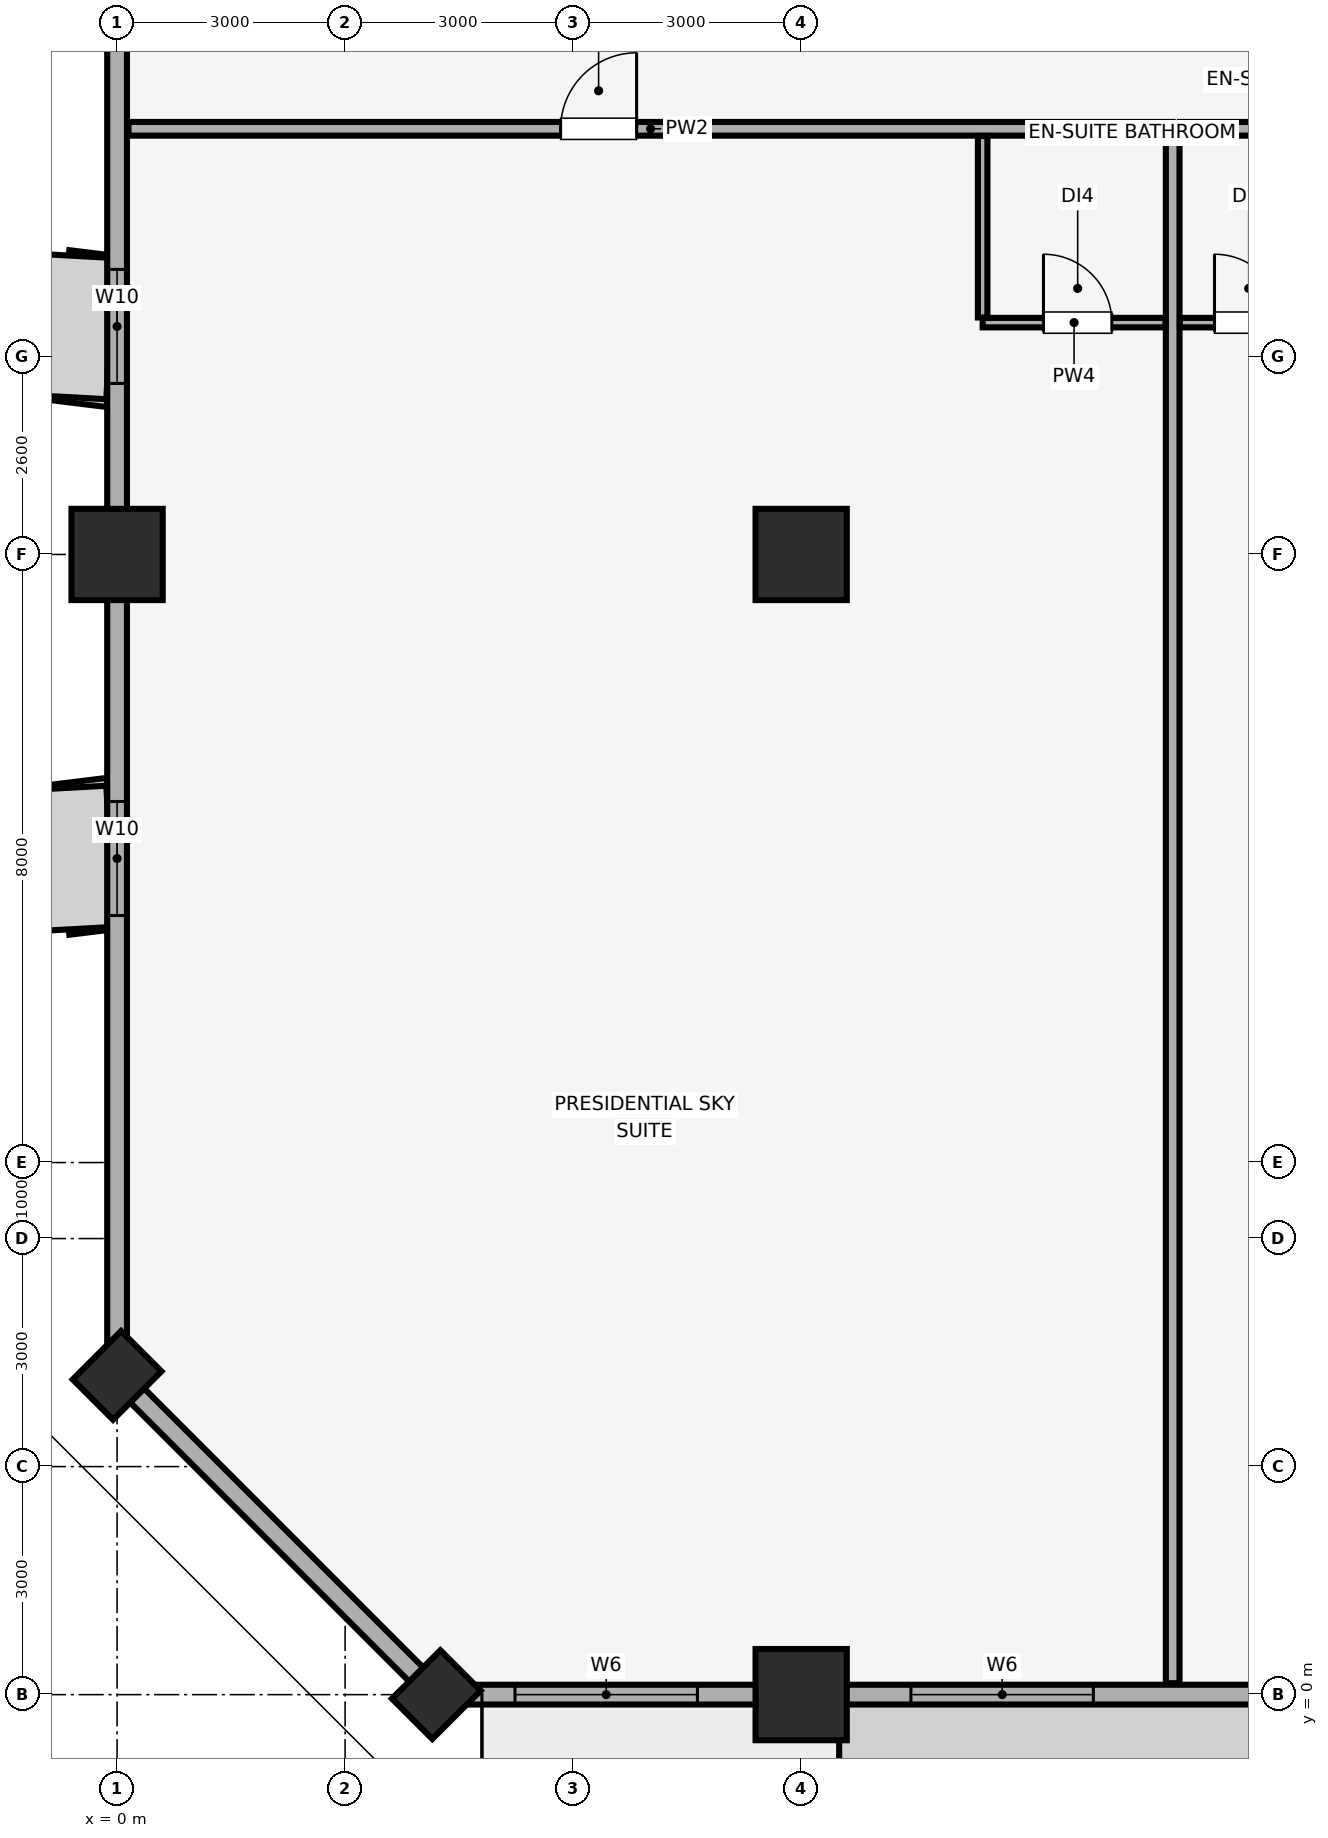
"""IFC4 building model, lengths in metres.
Left out: names, types, materials, properties, quantities, classifications, styles, units other than length and angle.
Written with IfcOpenShell. Run it as: python <this file> out.ifc"""

import sys

from ifc_helpers import new_model, si_unit, direction, frame, frame_2d, origin, origin_2d, place, context, subcontext, project, spatial, rectangle, extrude, element, fill, save


model = new_model("IFC4")
c1 = context("Model", 3, precision=1e-05, world=origin(), true_north=direction((0.0, 1.0)))
c2 = subcontext(c1, "Body", "Model", "MODEL_VIEW")
j1 = project(units=[si_unit("LENGTHUNIT", "METRE"), si_unit("PLANEANGLEUNIT", "RADIAN")], contexts=[c1])
p1 = place(None, origin())
s1 = spatial("IfcSite", under=j1, at=p1, CompositionType="ELEMENT")
p2 = place(p1, origin())
s2 = spatial("IfcBuilding", under=s1, at=p2, CompositionType="ELEMENT")
p3 = place(p2, frame((0.0, 0.0, 93.05)))
s3 = spatial("IfcBuildingStorey", under=s2, at=p3, CompositionType="ELEMENT", Elevation=93.05)
for number, where, z_axis, x_axis in (
    (1, (9.0, 0.0, 0.0), (0.0, 0.0, 1.0), (1.0, 0.0, 0.0)),
    (2, (0.0, 15.0, 0.0), (0.0, 0.0, 1.0), (1.0, 0.0, 0.0)),
):
    element("IfcColumn", number, at=place(p3, frame(where, z_axis=z_axis, x_axis=x_axis)), inside=s3, PredefinedType="COLUMN", context=c2, shape_type="SweptSolid", body=[
        extrude(rectangle(XDim=1.2, YDim=1.2, at=origin_2d()), origin(), (0.0, 0.0, 1.0), 3.51),
    ])
for number, where, z_axis, x_axis in (
    (3, (4.2, 0.0, 0.0), (0.0, 0.0, 1.0), (0.707, 0.707, 0.0)),
    (4, (0.0, 4.2, 0.0), (0.0, 0.0, 1.0), (0.707, 0.707, 0.0)),
):
    element("IfcColumn", number, at=place(p3, frame(where, z_axis=z_axis, x_axis=x_axis)), inside=s3, PredefinedType="PILASTER", context=c2, shape_type="SweptSolid", body=[
        extrude(rectangle(XDim=0.9, YDim=0.75, at=origin_2d()), origin(), (0.0, 0.0, 1.0), 3.51),
    ])
p4 = place(p3, frame((9.0, 15.0, 0.0), z_axis=(0.0, 0.0, 1.0), x_axis=(1.0, 0.0, 0.0)))
e5 = element("IfcColumn", 5, at=p4, inside=s3, PredefinedType="COLUMN", context=c2, shape_type="SweptSolid", body=[
    extrude(rectangle(XDim=1.2, YDim=1.2, at=origin_2d()), origin(), (0.0, 0.0, 1.0), 3.51),
])
p5 = place(p3, frame((4.2, 0.0, 0.0), z_axis=(0.0, 0.0, 1.0), x_axis=(1.0, 0.0, 0.0)))
e6 = element("IfcWall", 6, at=p5, inside=s3, PredefinedType="SOLIDWALL", context=c2, shape_type="SweptSolid", body=[
    extrude(rectangle(XDim=75.6, YDim=0.26, at=frame_2d((37.8, 0.0))), origin(), (0.0, 0.0, 1.0), 2.56),
])
p6 = place(p5, frame((21.383, 0.0, 0.0)))
e7 = element("IfcOpeningElement", 7, at=p6, cuts=e6, PredefinedType="OPENING", context=c2, shape_type="SweptSolid", body=[
    extrude(rectangle(XDim=1.1, YDim=2.15, at=frame_2d((0.55, 1.075))), frame((0.0, 0.14, 0.0), z_axis=(0.0, -1.0, 0.0), x_axis=(1.0, 0.0, 0.0)), (0.0, 0.0, 1.0), 0.28),
])
p7 = place(p5, frame((36.05, 0.0, 0.0)))
e8 = element("IfcOpeningElement", 8, at=p7, cuts=e6, PredefinedType="OPENING", context=c2, shape_type="SweptSolid", body=[
    extrude(rectangle(XDim=1.1, YDim=2.15, at=frame_2d((0.55, 1.075))), frame((0.0, 0.14, 0.0), z_axis=(0.0, -1.0, 0.0), x_axis=(1.0, 0.0, 0.0)), (0.0, 0.0, 1.0), 0.28),
])
p8 = place(p5, frame((53.117, 0.0, 0.0)))
e9 = element("IfcOpeningElement", 9, at=p8, cuts=e6, PredefinedType="OPENING", context=c2, shape_type="SweptSolid", body=[
    extrude(rectangle(XDim=1.1, YDim=2.15, at=frame_2d((0.55, 1.075))), frame((0.0, 0.14, 0.0), z_axis=(0.0, -1.0, 0.0), x_axis=(1.0, 0.0, 0.0)), (0.0, 0.0, 1.0), 0.28),
])
p9 = place(p5, frame((1.035, 0.0, 0.85)))
e10 = element("IfcOpeningElement", 10, at=p9, cuts=e6, PredefinedType="OPENING", context=c2, shape_type="SweptSolid", body=[
    extrude(rectangle(XDim=2.4, YDim=1.5, at=frame_2d((1.2, 0.75))), frame((0.0, 0.14, 0.0), z_axis=(0.0, -1.0, 0.0), x_axis=(1.0, 0.0, 0.0)), (0.0, 0.0, 1.0), 0.28),
])
p10 = place(p5, frame((6.244, 0.0, 0.85)))
e11 = element("IfcOpeningElement", 11, at=p10, cuts=e6, PredefinedType="OPENING", context=c2, shape_type="SweptSolid", body=[
    extrude(rectangle(XDim=2.4, YDim=1.5, at=frame_2d((1.2, 0.75))), frame((0.0, 0.14, 0.0), z_axis=(0.0, -1.0, 0.0), x_axis=(1.0, 0.0, 0.0)), (0.0, 0.0, 1.0), 0.28),
])
p11 = place(p5, frame((14.4, 0.0, 0.85)))
e12 = element("IfcOpeningElement", 12, at=p11, cuts=e6, PredefinedType="OPENING", context=c2, shape_type="SweptSolid", body=[
    extrude(rectangle(XDim=2.4, YDim=1.5, at=frame_2d((1.2, 0.75))), frame((0.0, 0.14, 0.0), z_axis=(0.0, -1.0, 0.0), x_axis=(1.0, 0.0, 0.0)), (0.0, 0.0, 1.0), 0.28),
])
p12 = place(p5, frame((23.127, 0.0, 0.85)))
e13 = element("IfcOpeningElement", 13, at=p12, cuts=e6, PredefinedType="OPENING", context=c2, shape_type="SweptSolid", body=[
    extrude(rectangle(XDim=2.4, YDim=1.5, at=frame_2d((1.2, 0.75))), frame((0.0, 0.14, 0.0), z_axis=(0.0, -1.0, 0.0), x_axis=(1.0, 0.0, 0.0)), (0.0, 0.0, 1.0), 0.28),
])
p13 = place(p5, frame((29.681, 0.0, 0.85)))
e14 = element("IfcOpeningElement", 14, at=p13, cuts=e6, PredefinedType="OPENING", context=c2, shape_type="SweptSolid", body=[
    extrude(rectangle(XDim=2.4, YDim=1.5, at=frame_2d((1.2, 0.75))), frame((0.0, 0.14, 0.0), z_axis=(0.0, -1.0, 0.0), x_axis=(1.0, 0.0, 0.0)), (0.0, 0.0, 1.0), 0.28),
])
p14 = place(p5, frame((38.601, 0.0, 0.85)))
e15 = element("IfcOpeningElement", 15, at=p14, cuts=e6, PredefinedType="OPENING", context=c2, shape_type="SweptSolid", body=[
    extrude(rectangle(XDim=2.4, YDim=1.5, at=frame_2d((1.2, 0.75))), frame((0.0, 0.14, 0.0), z_axis=(0.0, -1.0, 0.0), x_axis=(1.0, 0.0, 0.0)), (0.0, 0.0, 1.0), 0.28),
])
p15 = place(p5, frame((43.719, 0.0, 0.85)))
e16 = element("IfcOpeningElement", 16, at=p15, cuts=e6, PredefinedType="OPENING", context=c2, shape_type="SweptSolid", body=[
    extrude(rectangle(XDim=2.4, YDim=1.5, at=frame_2d((1.2, 0.75))), frame((0.0, 0.14, 0.0), z_axis=(0.0, -1.0, 0.0), x_axis=(1.0, 0.0, 0.0)), (0.0, 0.0, 1.0), 0.28),
])
p16 = place(p5, frame((50.073, 0.0, 0.85)))
e17 = element("IfcOpeningElement", 17, at=p16, cuts=e6, PredefinedType="OPENING", context=c2, shape_type="SweptSolid", body=[
    extrude(rectangle(XDim=2.4, YDim=1.5, at=frame_2d((1.2, 0.75))), frame((0.0, 0.14, 0.0), z_axis=(0.0, -1.0, 0.0), x_axis=(1.0, 0.0, 0.0)), (0.0, 0.0, 1.0), 0.28),
])
p17 = place(p5, frame((58.838, 0.0, 0.85)))
e18 = element("IfcOpeningElement", 18, at=p17, cuts=e6, PredefinedType="OPENING", context=c2, shape_type="SweptSolid", body=[
    extrude(rectangle(XDim=2.4, YDim=1.5, at=frame_2d((1.2, 0.75))), frame((0.0, 0.14, 0.0), z_axis=(0.0, -1.0, 0.0), x_axis=(1.0, 0.0, 0.0)), (0.0, 0.0, 1.0), 0.28),
])
p18 = place(p5, frame((67.056, 0.0, 0.85)))
e19 = element("IfcOpeningElement", 19, at=p18, cuts=e6, PredefinedType="OPENING", context=c2, shape_type="SweptSolid", body=[
    extrude(rectangle(XDim=2.4, YDim=1.5, at=frame_2d((1.2, 0.75))), frame((0.0, 0.14, 0.0), z_axis=(0.0, -1.0, 0.0), x_axis=(1.0, 0.0, 0.0)), (0.0, 0.0, 1.0), 0.28),
])
p19 = place(p5, frame((72.165, 0.0, 0.85)))
e20 = element("IfcOpeningElement", 20, at=p19, cuts=e6, PredefinedType="OPENING", context=c2, shape_type="SweptSolid", body=[
    extrude(rectangle(XDim=2.4, YDim=1.5, at=frame_2d((1.2, 0.75))), frame((0.0, 0.14, 0.0), z_axis=(0.0, -1.0, 0.0), x_axis=(1.0, 0.0, 0.0)), (0.0, 0.0, 1.0), 0.28),
])
p20 = place(p3, frame((0.0, 44.8, 0.0), z_axis=(0.0, 0.0, 1.0), x_axis=(0.0, -1.0, 0.0)))
e21 = element("IfcWall", 21, at=p20, inside=s3, PredefinedType="SOLIDWALL", context=c2, shape_type="SweptSolid", body=[
    extrude(rectangle(XDim=40.6, YDim=0.26, at=frame_2d((20.3, 0.0))), origin(), (0.0, 0.0, 1.0), 2.56),
])
p21 = place(p20, frame((33.05, 0.0, 0.85)))
e22 = element("IfcOpeningElement", 22, at=p21, cuts=e21, PredefinedType="OPENING", context=c2, shape_type="SweptSolid", body=[
    extrude(rectangle(XDim=1.5, YDim=1.4, at=frame_2d((0.75, 0.7))), frame((0.0, 0.14, 0.0), z_axis=(0.0, -1.0, 0.0), x_axis=(1.0, 0.0, 0.0)), (0.0, 0.0, 1.0), 0.28),
])
p22 = place(p20, frame((26.05, 0.0, 0.85)))
e23 = element("IfcOpeningElement", 23, at=p22, cuts=e21, PredefinedType="OPENING", context=c2, shape_type="SweptSolid", body=[
    extrude(rectangle(XDim=1.5, YDim=1.4, at=frame_2d((0.75, 0.7))), frame((0.0, 0.14, 0.0), z_axis=(0.0, -1.0, 0.0), x_axis=(1.0, 0.0, 0.0)), (0.0, 0.0, 1.0), 0.28),
])
p23 = place(p20, frame((18.325, 0.0, 0.85)))
e24 = element("IfcOpeningElement", 24, at=p23, cuts=e21, PredefinedType="OPENING", context=c2, shape_type="SweptSolid", body=[
    extrude(rectangle(XDim=1.5, YDim=1.4, at=frame_2d((0.75, 0.7))), frame((0.0, 0.14, 0.0), z_axis=(0.0, -1.0, 0.0), x_axis=(1.0, 0.0, 0.0)), (0.0, 0.0, 1.0), 0.28),
])
p24 = place(p20, frame((11.935, 0.0, 0.85)))
e25 = element("IfcOpeningElement", 25, at=p24, cuts=e21, PredefinedType="OPENING", context=c2, shape_type="SweptSolid", body=[
    extrude(rectangle(XDim=1.5, YDim=1.4, at=frame_2d((0.75, 0.7))), frame((0.0, 0.14, 0.0), z_axis=(0.0, -1.0, 0.0), x_axis=(1.0, 0.0, 0.0)), (0.0, 0.0, 1.0), 0.28),
])
p25 = place(p20, frame((7.165, 0.0, 0.85)))
e26 = element("IfcOpeningElement", 26, at=p25, cuts=e21, PredefinedType="OPENING", context=c2, shape_type="SweptSolid", body=[
    extrude(rectangle(XDim=1.5, YDim=1.4, at=frame_2d((0.75, 0.7))), frame((0.0, 0.14, 0.0), z_axis=(0.0, -1.0, 0.0), x_axis=(1.0, 0.0, 0.0)), (0.0, 0.0, 1.0), 0.28),
])
p26 = place(p20, frame((1.735, 0.0, 0.85)))
e27 = element("IfcOpeningElement", 27, at=p26, cuts=e21, PredefinedType="OPENING", context=c2, shape_type="SweptSolid", body=[
    extrude(rectangle(XDim=1.5, YDim=1.4, at=frame_2d((0.75, 0.7))), frame((0.0, 0.14, 0.0), z_axis=(0.0, -1.0, 0.0), x_axis=(1.0, 0.0, 0.0)), (0.0, 0.0, 1.0), 0.28),
])
p27 = place(p3, frame((0.0, 4.2, 0.0), z_axis=(0.0, 0.0, 1.0), x_axis=(0.707106781187, -0.707106781187, 0.0)))
e28 = element("IfcWall", 28, at=p27, inside=s3, PredefinedType="SOLIDWALL", context=c2, shape_type="SweptSolid", body=[
    extrude(rectangle(XDim=5.94, YDim=0.26, at=frame_2d((2.97, 0.0))), origin(), (0.0, 0.0, 1.0), 2.56),
])
p28 = place(p3, frame((0.15, 20.6, 0.0), z_axis=(0.0, 0.0, 1.0), x_axis=(1.0, 0.0, 0.0)))
e29 = element("IfcWall", 29, at=p28, inside=s3, PredefinedType="PARTITIONING", context=c2, shape_type="SweptSolid", body=[
    extrude(rectangle(XDim=13.738, YDim=0.18, at=frame_2d((6.869, 0.0))), origin(), (0.0, 0.0, 1.0), 3.51),
])
p29 = place(p28, frame((5.685, 0.0, 0.0)))
e30 = element("IfcOpeningElement", 30, at=p29, cuts=e29, PredefinedType="OPENING", context=c2, shape_type="SweptSolid", body=[
    extrude(rectangle(XDim=1.0, YDim=2.15, at=frame_2d((0.5, 1.075))), frame((0.0, 0.1, 0.0), z_axis=(0.0, -1.0, 0.0), x_axis=(1.0, 0.0, 0.0)), (0.0, 0.0, 1.0), 0.2),
])
p30 = place(p3, frame((13.888, 0.15, 0.0), z_axis=(0.0, 0.0, 1.0), x_axis=(0.0, 1.0, 0.0)))
e31 = element("IfcWall", 31, at=p30, inside=s3, PredefinedType="PARTITIONING", context=c2, shape_type="SweptSolid", body=[
    extrude(rectangle(XDim=20.355, YDim=0.18, at=frame_2d((10.177, 0.0))), origin(), (0.0, 0.0, 1.0), 3.51),
])
p31 = place(p3, frame((11.388, 18.05, 0.0), z_axis=(0.0, 0.0, 1.0), x_axis=(1.0, 0.0, 0.0)))
e32 = element("IfcWall", 32, at=p31, inside=s3, PredefinedType="PARTITIONING", context=c2, shape_type="SweptSolid", body=[
    extrude(rectangle(XDim=2.405, YDim=0.125, at=frame_2d((1.203, 0.0))), origin(), (0.0, 0.0, 1.0), 3.51),
])
p32 = place(p31, frame((0.8, 0.0, 0.0)))
e33 = element("IfcOpeningElement", 33, at=p32, cuts=e32, PredefinedType="OPENING", context=c2, shape_type="SweptSolid", body=[
    extrude(rectangle(XDim=0.9, YDim=2.1, at=frame_2d((0.45, 1.05))), frame((0.0, 0.073, 0.0), z_axis=(0.0, -1.0, 0.0), x_axis=(1.0, 0.0, 0.0)), (0.0, 0.0, 1.0), 0.145),
])
p33 = place(p3, frame((11.388, 18.117, 0.0), z_axis=(0.0, 0.0, 1.0), x_axis=(0.0, 1.0, 0.0)))
e34 = element("IfcWall", 34, at=p33, inside=s3, PredefinedType="PARTITIONING", context=c2, shape_type="SweptSolid", body=[
    extrude(rectangle(XDim=2.387, YDim=0.125, at=frame_2d((1.194, 0.0))), origin(), (0.0, 0.0, 1.0), 3.51),
])
p34 = place(p3, frame((13.983, 20.6, 0.0), z_axis=(0.0, 0.0, 1.0), x_axis=(1.0, 0.0, 0.0)))
e35 = element("IfcWall", 35, at=p34, inside=s3, PredefinedType="PARTITIONING", context=c2, shape_type="SweptSolid", body=[
    extrude(rectangle(XDim=9.343, YDim=0.18, at=frame_2d((4.671, 0.0))), origin(), (0.0, 0.0, 1.0), 3.51),
])
p35 = place(p34, frame((5.471, 0.0, 0.0)))
e36 = element("IfcOpeningElement", 36, at=p35, cuts=e35, PredefinedType="OPENING", context=c2, shape_type="SweptSolid", body=[
    extrude(rectangle(XDim=1.0, YDim=2.15, at=frame_2d((0.5, 1.075))), frame((0.0, 0.1, 0.0), z_axis=(0.0, -1.0, 0.0), x_axis=(1.0, 0.0, 0.0)), (0.0, 0.0, 1.0), 0.2),
])
p36 = place(p3, frame((13.983, 18.05, 0.0), z_axis=(0.0, 0.0, 1.0), x_axis=(1.0, 0.0, 0.0)))
e37 = element("IfcWall", 37, at=p36, inside=s3, PredefinedType="PARTITIONING", context=c2, shape_type="SweptSolid", body=[
    extrude(rectangle(XDim=2.405, YDim=0.125, at=frame_2d((1.203, 0.0))), origin(), (0.0, 0.0, 1.0), 3.51),
])
p37 = place(p36, frame((0.455, 0.0, 0.0)))
e38 = element("IfcOpeningElement", 38, at=p37, cuts=e37, PredefinedType="OPENING", context=c2, shape_type="SweptSolid", body=[
    extrude(rectangle(XDim=0.9, YDim=2.1, at=frame_2d((0.45, 1.05))), frame((0.0, 0.073, 0.0), z_axis=(0.0, -1.0, 0.0), x_axis=(1.0, 0.0, 0.0)), (0.0, 0.0, 1.0), 0.145),
])
p38 = place(p9, origin())
e39 = element("IfcWindow", 39, at=p38, inside=s3, PartitioningType="SINGLE_PANEL", PredefinedType="WINDOW", context=c2, shape_type="SweptSolid", body=[
    extrude(rectangle(XDim=2.4, YDim=1.5, at=frame_2d((1.2, 0.75))), frame((0.0, 0.03, 0.0), z_axis=(0.0, -1.0, 0.0), x_axis=(1.0, 0.0, 0.0)), (0.0, 0.0, 1.0), 0.06),
])
fill(e10, e39)
p39 = place(p10, origin())
e40 = element("IfcWindow", 40, at=p39, inside=s3, PartitioningType="SINGLE_PANEL", PredefinedType="WINDOW", context=c2, shape_type="SweptSolid", body=[
    extrude(rectangle(XDim=2.4, YDim=1.5, at=frame_2d((1.2, 0.75))), frame((0.0, 0.03, 0.0), z_axis=(0.0, -1.0, 0.0), x_axis=(1.0, 0.0, 0.0)), (0.0, 0.0, 1.0), 0.06),
])
fill(e11, e40)
p40 = place(p21, origin())
e41 = element("IfcWindow", 41, at=p40, inside=s3, PartitioningType="SINGLE_PANEL", PredefinedType="WINDOW", context=c2, shape_type="SweptSolid", body=[
    extrude(rectangle(XDim=1.5, YDim=1.4, at=frame_2d((0.75, 0.7))), frame((0.0, 0.03, 0.0), z_axis=(0.0, -1.0, 0.0), x_axis=(1.0, 0.0, 0.0)), (0.0, 0.0, 1.0), 0.06),
])
fill(e22, e41)
p41 = place(p22, origin())
e42 = element("IfcWindow", 42, at=p41, inside=s3, PartitioningType="SINGLE_PANEL", PredefinedType="WINDOW", context=c2, shape_type="SweptSolid", body=[
    extrude(rectangle(XDim=1.5, YDim=1.4, at=frame_2d((0.75, 0.7))), frame((0.0, 0.03, 0.0), z_axis=(0.0, -1.0, 0.0), x_axis=(1.0, 0.0, 0.0)), (0.0, 0.0, 1.0), 0.06),
])
fill(e23, e42)
p42 = place(p29, origin())
e43 = element("IfcDoor", 43, at=p42, inside=s3, OperationType="SINGLE_SWING_RIGHT", PredefinedType="DOOR", context=c2, shape_type="SweptSolid", body=[
    extrude(rectangle(XDim=1.0, YDim=2.15, at=frame_2d((0.5, 1.075))), frame((0.0, 0.025, 0.0), z_axis=(0.0, -1.0, 0.0), x_axis=(1.0, 0.0, 0.0)), (0.0, 0.0, 1.0), 0.05),
])
fill(e30, e43)
p43 = place(p32, origin())
e44 = element("IfcDoor", 44, at=p43, inside=s3, OperationType="SINGLE_SWING_LEFT", PredefinedType="DOOR", context=c2, shape_type="SweptSolid", body=[
    extrude(rectangle(XDim=0.9, YDim=2.1, at=frame_2d((0.45, 1.05))), frame((0.0, 0.025, 0.0), z_axis=(0.0, -1.0, 0.0), x_axis=(1.0, 0.0, 0.0)), (0.0, 0.0, 1.0), 0.05),
])
fill(e33, e44)
p44 = place(p37, origin())
e45 = element("IfcDoor", 45, at=p44, inside=s3, OperationType="SINGLE_SWING_LEFT", PredefinedType="DOOR", context=c2, shape_type="SweptSolid", body=[
    extrude(rectangle(XDim=0.9, YDim=2.1, at=frame_2d((0.45, 1.05))), frame((0.0, 0.025, 0.0), z_axis=(0.0, -1.0, 0.0), x_axis=(1.0, 0.0, 0.0)), (0.0, 0.0, 1.0), 0.05),
])
fill(e38, e45)
save(model, sys.argv[1])
